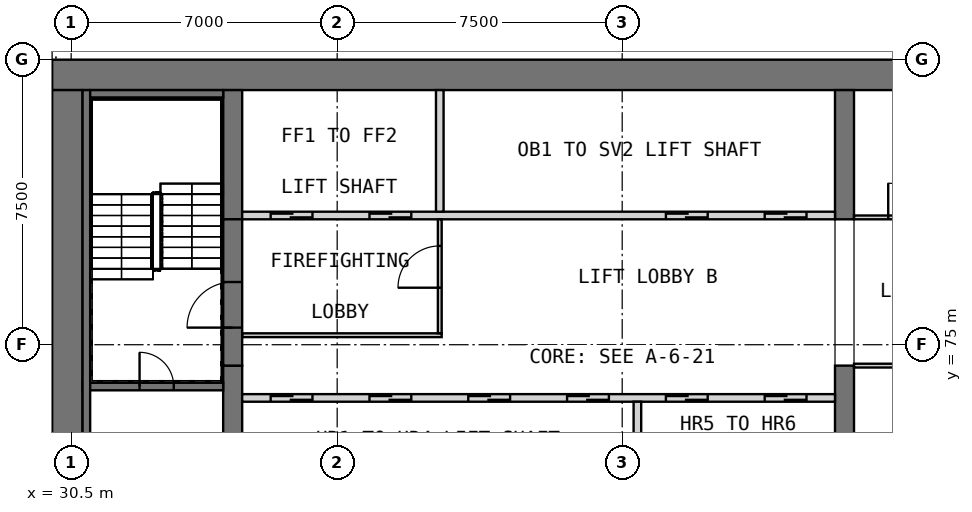
"""IFC4 building model, lengths in metres.
Left out: names, types, materials, properties, quantities, classifications, styles, units other than length and angle.
Written with IfcOpenShell. Run it as: python <this file> out.ifc"""

import sys

from ifc_helpers import new_model, si_unit, direction, frame, frame_2d, origin, place, context, subcontext, project, spatial, rectangle, extrude, element, fill, save


model = new_model("IFC4")
c1 = context("Model", 3, precision=1e-05, world=origin(), true_north=direction((0.0, 1.0)))
c2 = subcontext(c1, "Body", "Model", "MODEL_VIEW")
j1 = project(units=[si_unit("LENGTHUNIT", "METRE"), si_unit("PLANEANGLEUNIT", "RADIAN")], contexts=[c1])
p1 = place(None, origin())
s1 = spatial("IfcSite", under=j1, at=p1, CompositionType="ELEMENT")
p2 = place(p1, origin())
s2 = spatial("IfcBuilding", under=s1, at=p2, CompositionType="ELEMENT")
p3 = place(p2, frame((0.0, 0.0, 166.2)))
s3 = spatial("IfcBuildingStorey", under=s2, at=p3, CompositionType="ELEMENT", Elevation=166.2)
p4 = place(p3, frame((30.0, 82.1, 0.0), z_axis=(0.0, 0.0, 1.0), x_axis=(1.0, 0.0, 0.0)))
e1 = element("IfcWall", 1, at=p4, inside=s3, PredefinedType="SHEAR", context=c2, shape_type="SweptSolid", body=[
    extrude(rectangle(XDim=30.0, YDim=0.8, at=frame_2d((15.0, 0.0))), origin(), (0.0, 0.0, 1.0), 8.0),
])
p5 = place(p3, frame((30.4, 60.8, 0.0), z_axis=(0.0, 0.0, 1.0), x_axis=(0.0, 1.0, 0.0)))
e2 = element("IfcWall", 2, at=p5, inside=s3, PredefinedType="SHEAR", context=c2, shape_type="SweptSolid", body=[
    extrude(rectangle(XDim=20.9, YDim=0.8, at=frame_2d((10.45, 0.0))), origin(), (0.0, 0.0, 1.0), 8.0),
])
p6 = place(p3, frame((34.75, 68.05, 0.0), z_axis=(0.0, 0.0, 1.0), x_axis=(0.0, 1.0, 0.0)))
e3 = element("IfcWall", 3, at=p6, inside=s3, PredefinedType="SHEAR", context=c2, shape_type="SweptSolid", body=[
    extrude(rectangle(XDim=6.4, YDim=0.5, at=frame_2d((3.2, 0.0))), origin(), (0.0, 0.0, 1.0), 8.0),
])
p7 = place(p3, frame((34.75, 78.3, 0.0), z_axis=(0.0, 0.0, 1.0), x_axis=(0.0, 1.0, 0.0)))
e4 = element("IfcWall", 4, at=p7, inside=s3, PredefinedType="SHEAR", context=c2, shape_type="SweptSolid", body=[
    extrude(rectangle(XDim=3.4, YDim=0.5, at=frame_2d((1.7, 0.0))), origin(), (0.0, 0.0, 1.0), 8.0),
])
p8 = place(p3, frame((50.85, 68.05, 0.0), z_axis=(0.0, 0.0, 1.0), x_axis=(0.0, 1.0, 0.0)))
e5 = element("IfcWall", 5, at=p8, inside=s3, PredefinedType="SHEAR", context=c2, shape_type="SweptSolid", body=[
    extrude(rectangle(XDim=6.4, YDim=0.5, at=frame_2d((3.2, 0.0))), origin(), (0.0, 0.0, 1.0), 8.0),
])
p9 = place(p3, frame((50.85, 78.3, 0.0), z_axis=(0.0, 0.0, 1.0), x_axis=(0.0, 1.0, 0.0)))
e6 = element("IfcWall", 6, at=p9, inside=s3, PredefinedType="SHEAR", context=c2, shape_type="SweptSolid", body=[
    extrude(rectangle(XDim=3.4, YDim=0.5, at=frame_2d((1.7, 0.0))), origin(), (0.0, 0.0, 1.0), 8.0),
])
p10 = place(p3, frame((35.0, 73.6, 0.0), z_axis=(0.0, 0.0, 1.0), x_axis=(1.0, 0.0, 0.0)))
e7 = element("IfcWall", 7, at=p10, inside=s3, PredefinedType="SOLIDWALL", context=c2, shape_type="SweptSolid", body=[
    extrude(rectangle(XDim=15.6, YDim=0.2, at=frame_2d((7.8, 0.0))), origin(), (0.0, 0.0, 1.0), 8.0),
])
p11 = place(p10, frame((0.75, 0.0, 0.0)))
e8 = element("IfcOpeningElement", 8, at=p11, cuts=e7, PredefinedType="OPENING", context=c2, shape_type="SweptSolid", body=[
    extrude(rectangle(XDim=1.1, YDim=2.1, at=frame_2d((0.55, 1.05))), frame((0.0, 0.11, 0.0), z_axis=(0.0, -1.0, 0.0), x_axis=(1.0, 0.0, 0.0)), (0.0, 0.0, 1.0), 0.22),
])
p12 = place(p10, frame((3.35, 0.0, 0.0)))
e9 = element("IfcOpeningElement", 9, at=p12, cuts=e7, PredefinedType="OPENING", context=c2, shape_type="SweptSolid", body=[
    extrude(rectangle(XDim=1.1, YDim=2.1, at=frame_2d((0.55, 1.05))), frame((0.0, 0.11, 0.0), z_axis=(0.0, -1.0, 0.0), x_axis=(1.0, 0.0, 0.0)), (0.0, 0.0, 1.0), 0.22),
])
p13 = place(p10, frame((5.95, 0.0, 0.0)))
e10 = element("IfcOpeningElement", 10, at=p13, cuts=e7, PredefinedType="OPENING", context=c2, shape_type="SweptSolid", body=[
    extrude(rectangle(XDim=1.1, YDim=2.1, at=frame_2d((0.55, 1.05))), frame((0.0, 0.11, 0.0), z_axis=(0.0, -1.0, 0.0), x_axis=(1.0, 0.0, 0.0)), (0.0, 0.0, 1.0), 0.22),
])
p14 = place(p10, frame((8.55, 0.0, 0.0)))
e11 = element("IfcOpeningElement", 11, at=p14, cuts=e7, PredefinedType="OPENING", context=c2, shape_type="SweptSolid", body=[
    extrude(rectangle(XDim=1.1, YDim=2.1, at=frame_2d((0.55, 1.05))), frame((0.0, 0.11, 0.0), z_axis=(0.0, -1.0, 0.0), x_axis=(1.0, 0.0, 0.0)), (0.0, 0.0, 1.0), 0.22),
])
p15 = place(p10, frame((11.15, 0.0, 0.0)))
e12 = element("IfcOpeningElement", 12, at=p15, cuts=e7, PredefinedType="OPENING", context=c2, shape_type="SweptSolid", body=[
    extrude(rectangle(XDim=1.1, YDim=2.1, at=frame_2d((0.55, 1.05))), frame((0.0, 0.11, 0.0), z_axis=(0.0, -1.0, 0.0), x_axis=(1.0, 0.0, 0.0)), (0.0, 0.0, 1.0), 0.22),
])
p16 = place(p10, frame((13.75, 0.0, 0.0)))
e13 = element("IfcOpeningElement", 13, at=p16, cuts=e7, PredefinedType="OPENING", context=c2, shape_type="SweptSolid", body=[
    extrude(rectangle(XDim=1.1, YDim=2.1, at=frame_2d((0.55, 1.05))), frame((0.0, 0.11, 0.0), z_axis=(0.0, -1.0, 0.0), x_axis=(1.0, 0.0, 0.0)), (0.0, 0.0, 1.0), 0.22),
])
p17 = place(p3, frame((45.4, 71.5, 0.0), z_axis=(0.0, 0.0, 1.0), x_axis=(0.0, 1.0, 0.0)))
e14 = element("IfcWall", 14, at=p17, inside=s3, PredefinedType="SOLIDWALL", context=c2, shape_type="SweptSolid", body=[
    extrude(rectangle(XDim=2.0, YDim=0.2, at=frame_2d((1.0, 0.0))), origin(), (0.0, 0.0, 1.0), 8.0),
])
p18 = place(p3, frame((35.0, 78.4, 0.0), z_axis=(0.0, 0.0, 1.0), x_axis=(1.0, 0.0, 0.0)))
e15 = element("IfcWall", 15, at=p18, inside=s3, PredefinedType="SOLIDWALL", context=c2, shape_type="SweptSolid", body=[
    extrude(rectangle(XDim=15.6, YDim=0.2, at=frame_2d((7.8, 0.0))), origin(), (0.0, 0.0, 1.0), 8.0),
])
p19 = place(p18, frame((0.75, 0.0, 0.0)))
e16 = element("IfcOpeningElement", 16, at=p19, cuts=e15, PredefinedType="OPENING", context=c2, shape_type="SweptSolid", body=[
    extrude(rectangle(XDim=1.1, YDim=2.1, at=frame_2d((0.55, 1.05))), frame((0.0, 0.11, 0.0), z_axis=(0.0, -1.0, 0.0), x_axis=(1.0, 0.0, 0.0)), (0.0, 0.0, 1.0), 0.22),
])
p20 = place(p18, frame((3.35, 0.0, 0.0)))
e17 = element("IfcOpeningElement", 17, at=p20, cuts=e15, PredefinedType="OPENING", context=c2, shape_type="SweptSolid", body=[
    extrude(rectangle(XDim=1.1, YDim=2.1, at=frame_2d((0.55, 1.05))), frame((0.0, 0.11, 0.0), z_axis=(0.0, -1.0, 0.0), x_axis=(1.0, 0.0, 0.0)), (0.0, 0.0, 1.0), 0.22),
])
p21 = place(p18, frame((11.15, 0.0, 0.0)))
e18 = element("IfcOpeningElement", 18, at=p21, cuts=e15, PredefinedType="OPENING", context=c2, shape_type="SweptSolid", body=[
    extrude(rectangle(XDim=1.1, YDim=2.1, at=frame_2d((0.55, 1.05))), frame((0.0, 0.11, 0.0), z_axis=(0.0, -1.0, 0.0), x_axis=(1.0, 0.0, 0.0)), (0.0, 0.0, 1.0), 0.22),
])
p22 = place(p18, frame((13.75, 0.0, 0.0)))
e19 = element("IfcOpeningElement", 19, at=p22, cuts=e15, PredefinedType="OPENING", context=c2, shape_type="SweptSolid", body=[
    extrude(rectangle(XDim=1.1, YDim=2.1, at=frame_2d((0.55, 1.05))), frame((0.0, 0.11, 0.0), z_axis=(0.0, -1.0, 0.0), x_axis=(1.0, 0.0, 0.0)), (0.0, 0.0, 1.0), 0.22),
])
p23 = place(p3, frame((40.2, 78.5, 0.0), z_axis=(0.0, 0.0, 1.0), x_axis=(0.0, 1.0, 0.0)))
e20 = element("IfcWall", 20, at=p23, inside=s3, PredefinedType="SOLIDWALL", context=c2, shape_type="SweptSolid", body=[
    extrude(rectangle(XDim=3.2, YDim=0.2, at=frame_2d((1.6, 0.0))), origin(), (0.0, 0.0, 1.0), 8.0),
])
p24 = place(p3, frame((35.0, 75.25, 0.0), z_axis=(0.0, 0.0, 1.0), x_axis=(1.0, 0.0, 0.0)))
e21 = element("IfcWall", 21, at=p24, inside=s3, PredefinedType="PARTITIONING", context=c2, shape_type="SweptSolid", body=[
    extrude(rectangle(XDim=5.25, YDim=0.1, at=frame_2d((2.625, 0.0))), origin(), (0.0, 0.0, 1.0), 7.7),
])
p25 = place(p3, frame((40.2, 75.3, 0.0), z_axis=(0.0, 0.0, 1.0), x_axis=(0.0, 1.0, 0.0)))
e22 = element("IfcWall", 22, at=p25, inside=s3, PredefinedType="PARTITIONING", context=c2, shape_type="SweptSolid", body=[
    extrude(rectangle(XDim=3.0, YDim=0.1, at=frame_2d((1.5, 0.0))), origin(), (0.0, 0.0, 1.0), 7.7),
])
p26 = place(p25, frame((1.2, 0.0, 0.0)))
e23 = element("IfcOpeningElement", 23, at=p26, cuts=e22, PredefinedType="OPENING", context=c2, shape_type="SweptSolid", body=[
    extrude(rectangle(XDim=1.1, YDim=2.1, at=frame_2d((0.55, 1.05))), frame((0.0, 0.06, 0.0), z_axis=(0.0, -1.0, 0.0), x_axis=(1.0, 0.0, 0.0)), (0.0, 0.0, 1.0), 0.12),
])
p27 = place(p3, frame((34.75, 74.45, 0.0), z_axis=(0.0, 0.0, 1.0), x_axis=(0.0, 1.0, 0.0)))
e24 = element("IfcWall", 24, at=p27, inside=s3, PredefinedType="SOLIDWALL", context=c2, shape_type="SweptSolid", body=[
    extrude(rectangle(XDim=3.85, YDim=0.5, at=frame_2d((1.925, 0.0))), origin(), (0.0, 0.0, 1.0), 6.8),
])
p28 = place(p27, frame((1.0, 0.0, 0.0)))
e25 = element("IfcOpeningElement", 25, at=p28, cuts=e24, PredefinedType="OPENING", context=c2, shape_type="SweptSolid", body=[
    extrude(rectangle(XDim=1.2, YDim=2.1, at=frame_2d((0.6, 1.05))), frame((0.0, 0.26, 0.0), z_axis=(0.0, -1.0, 0.0), x_axis=(1.0, 0.0, 0.0)), (0.0, 0.0, 1.0), 0.52),
])
p29 = place(p3, frame((30.8, 73.9, 0.0), z_axis=(0.0, 0.0, 1.0), x_axis=(1.0, 0.0, 0.0)))
e26 = element("IfcWall", 26, at=p29, inside=s3, PredefinedType="SOLIDWALL", context=c2, shape_type="SweptSolid", body=[
    extrude(rectangle(XDim=3.7, YDim=0.2, at=frame_2d((1.85, 0.0))), origin(), (0.0, 0.0, 1.0), 7.7),
])
p30 = place(p29, frame((1.5, 0.0, 0.0)))
e27 = element("IfcOpeningElement", 27, at=p30, cuts=e26, PredefinedType="OPENING", context=c2, shape_type="SweptSolid", body=[
    extrude(rectangle(XDim=0.9, YDim=2.1, at=frame_2d((0.45, 1.05))), frame((0.0, 0.11, 0.0), z_axis=(0.0, -1.0, 0.0), x_axis=(1.0, 0.0, 0.0)), (0.0, 0.0, 1.0), 0.22),
])
p31 = place(p3, frame((30.9, 60.8, 0.0), z_axis=(0.0, 0.0, 1.0), x_axis=(0.0, 1.0, 0.0)))
e28 = element("IfcWall", 28, at=p31, inside=s3, PredefinedType="SOLIDWALL", context=c2, shape_type="SweptSolid", body=[
    extrude(rectangle(XDim=20.9, YDim=0.2, at=frame_2d((10.45, 0.0))), origin(), (0.0, 0.0, 1.0), 7.7),
])
p32 = place(p3, frame((31.0, 81.6, 0.0), z_axis=(0.0, 0.0, 1.0), x_axis=(1.0, 0.0, 0.0)))
e29 = element("IfcWall", 29, at=p32, inside=s3, PredefinedType="SOLIDWALL", context=c2, shape_type="SweptSolid", body=[
    extrude(rectangle(XDim=3.5, YDim=0.2, at=frame_2d((1.75, 0.0))), origin(), (0.0, 0.0, 1.0), 7.7),
])
p33 = place(p3, frame((51.1, 74.45, 0.0), z_axis=(0.0, 0.0, 1.0), x_axis=(1.0, 0.0, 0.0)))
e30 = element("IfcWall", 30, at=p33, inside=s3, PredefinedType="PARTITIONING", context=c2, shape_type="SweptSolid", body=[
    extrude(rectangle(XDim=8.1, YDim=0.1, at=frame_2d((4.05, 0.0))), origin(), (0.0, 0.0, 1.0), 7.7),
])
p34 = place(p33, frame((3.6, 0.0, 0.0)))
e31 = element("IfcOpeningElement", 31, at=p34, cuts=e30, PredefinedType="OPENING", context=c2, shape_type="SweptSolid", body=[
    extrude(rectangle(XDim=0.9, YDim=2.1, at=frame_2d((0.45, 1.05))), frame((0.0, 0.06, 0.0), z_axis=(0.0, -1.0, 0.0), x_axis=(1.0, 0.0, 0.0)), (0.0, 0.0, 1.0), 0.12),
])
p35 = place(p3, frame((51.1, 78.35, 0.0), z_axis=(0.0, 0.0, 1.0), x_axis=(1.0, 0.0, 0.0)))
e32 = element("IfcWall", 32, at=p35, inside=s3, PredefinedType="PARTITIONING", context=c2, shape_type="SweptSolid", body=[
    extrude(rectangle(XDim=8.1, YDim=0.1, at=frame_2d((4.05, 0.0))), origin(), (0.0, 0.0, 1.0), 7.7),
])
p36 = place(p35, frame((0.9, 0.0, 0.0)))
e33 = element("IfcOpeningElement", 33, at=p36, cuts=e32, PredefinedType="OPENING", context=c2, shape_type="SweptSolid", body=[
    extrude(rectangle(XDim=0.9, YDim=2.1, at=frame_2d((0.45, 1.05))), frame((0.0, 0.06, 0.0), z_axis=(0.0, -1.0, 0.0), x_axis=(1.0, 0.0, 0.0)), (0.0, 0.0, 1.0), 0.12),
])
p37 = place(p35, frame((4.95, 0.0, 0.0)))
e34 = element("IfcOpeningElement", 34, at=p37, cuts=e32, PredefinedType="OPENING", context=c2, shape_type="SweptSolid", body=[
    extrude(rectangle(XDim=0.9, YDim=2.1, at=frame_2d((0.45, 1.05))), frame((0.0, 0.06, 0.0), z_axis=(0.0, -1.0, 0.0), x_axis=(1.0, 0.0, 0.0)), (0.0, 0.0, 1.0), 0.12),
])
p38 = place(p11, origin())
e35 = element("IfcDoor", 35, at=p38, inside=s3, OperationType="DOUBLE_DOOR_SLIDING", PredefinedType="DOOR", context=c2, shape_type="SweptSolid", body=[
    extrude(rectangle(XDim=1.1, YDim=2.1, at=frame_2d((0.55, 1.05))), frame((0.0, 0.025, 0.0), z_axis=(0.0, -1.0, 0.0), x_axis=(1.0, 0.0, 0.0)), (0.0, 0.0, 1.0), 0.05),
])
fill(e8, e35)
p39 = place(p12, origin())
e36 = element("IfcDoor", 36, at=p39, inside=s3, OperationType="DOUBLE_DOOR_SLIDING", PredefinedType="DOOR", context=c2, shape_type="SweptSolid", body=[
    extrude(rectangle(XDim=1.1, YDim=2.1, at=frame_2d((0.55, 1.05))), frame((0.0, 0.025, 0.0), z_axis=(0.0, -1.0, 0.0), x_axis=(1.0, 0.0, 0.0)), (0.0, 0.0, 1.0), 0.05),
])
fill(e9, e36)
p40 = place(p13, origin())
e37 = element("IfcDoor", 37, at=p40, inside=s3, OperationType="DOUBLE_DOOR_SLIDING", PredefinedType="DOOR", context=c2, shape_type="SweptSolid", body=[
    extrude(rectangle(XDim=1.1, YDim=2.1, at=frame_2d((0.55, 1.05))), frame((0.0, 0.025, 0.0), z_axis=(0.0, -1.0, 0.0), x_axis=(1.0, 0.0, 0.0)), (0.0, 0.0, 1.0), 0.05),
])
fill(e10, e37)
p41 = place(p14, origin())
e38 = element("IfcDoor", 38, at=p41, inside=s3, OperationType="DOUBLE_DOOR_SLIDING", PredefinedType="DOOR", context=c2, shape_type="SweptSolid", body=[
    extrude(rectangle(XDim=1.1, YDim=2.1, at=frame_2d((0.55, 1.05))), frame((0.0, 0.025, 0.0), z_axis=(0.0, -1.0, 0.0), x_axis=(1.0, 0.0, 0.0)), (0.0, 0.0, 1.0), 0.05),
])
fill(e11, e38)
p42 = place(p15, origin())
e39 = element("IfcDoor", 39, at=p42, inside=s3, OperationType="DOUBLE_DOOR_SLIDING", PredefinedType="DOOR", context=c2, shape_type="SweptSolid", body=[
    extrude(rectangle(XDim=1.1, YDim=2.1, at=frame_2d((0.55, 1.05))), frame((0.0, 0.025, 0.0), z_axis=(0.0, -1.0, 0.0), x_axis=(1.0, 0.0, 0.0)), (0.0, 0.0, 1.0), 0.05),
])
fill(e12, e39)
p43 = place(p16, origin())
e40 = element("IfcDoor", 40, at=p43, inside=s3, OperationType="DOUBLE_DOOR_SLIDING", PredefinedType="DOOR", context=c2, shape_type="SweptSolid", body=[
    extrude(rectangle(XDim=1.1, YDim=2.1, at=frame_2d((0.55, 1.05))), frame((0.0, 0.025, 0.0), z_axis=(0.0, -1.0, 0.0), x_axis=(1.0, 0.0, 0.0)), (0.0, 0.0, 1.0), 0.05),
])
fill(e13, e40)
p44 = place(p19, origin())
e41 = element("IfcDoor", 41, at=p44, inside=s3, OperationType="DOUBLE_DOOR_SLIDING", PredefinedType="DOOR", context=c2, shape_type="SweptSolid", body=[
    extrude(rectangle(XDim=1.1, YDim=2.1, at=frame_2d((0.55, 1.05))), frame((0.0, 0.025, 0.0), z_axis=(0.0, -1.0, 0.0), x_axis=(1.0, 0.0, 0.0)), (0.0, 0.0, 1.0), 0.05),
])
fill(e16, e41)
p45 = place(p20, origin())
e42 = element("IfcDoor", 42, at=p45, inside=s3, OperationType="DOUBLE_DOOR_SLIDING", PredefinedType="DOOR", context=c2, shape_type="SweptSolid", body=[
    extrude(rectangle(XDim=1.1, YDim=2.1, at=frame_2d((0.55, 1.05))), frame((0.0, 0.025, 0.0), z_axis=(0.0, -1.0, 0.0), x_axis=(1.0, 0.0, 0.0)), (0.0, 0.0, 1.0), 0.05),
])
fill(e17, e42)
p46 = place(p21, origin())
e43 = element("IfcDoor", 43, at=p46, inside=s3, OperationType="DOUBLE_DOOR_SLIDING", PredefinedType="DOOR", context=c2, shape_type="SweptSolid", body=[
    extrude(rectangle(XDim=1.1, YDim=2.1, at=frame_2d((0.55, 1.05))), frame((0.0, 0.025, 0.0), z_axis=(0.0, -1.0, 0.0), x_axis=(1.0, 0.0, 0.0)), (0.0, 0.0, 1.0), 0.05),
])
fill(e18, e43)
p47 = place(p22, origin())
e44 = element("IfcDoor", 44, at=p47, inside=s3, OperationType="DOUBLE_DOOR_SLIDING", PredefinedType="DOOR", context=c2, shape_type="SweptSolid", body=[
    extrude(rectangle(XDim=1.1, YDim=2.1, at=frame_2d((0.55, 1.05))), frame((0.0, 0.025, 0.0), z_axis=(0.0, -1.0, 0.0), x_axis=(1.0, 0.0, 0.0)), (0.0, 0.0, 1.0), 0.05),
])
fill(e19, e44)
p48 = place(p26, origin())
e45 = element("IfcDoor", 45, at=p48, inside=s3, OperationType="SINGLE_SWING_LEFT", PredefinedType="DOOR", context=c2, shape_type="SweptSolid", body=[
    extrude(rectangle(XDim=1.1, YDim=2.1, at=frame_2d((0.55, 1.05))), frame((0.0, 0.025, 0.0), z_axis=(0.0, -1.0, 0.0), x_axis=(1.0, 0.0, 0.0)), (0.0, 0.0, 1.0), 0.05),
])
fill(e23, e45)
p49 = place(p28, origin())
e46 = element("IfcDoor", 46, at=p49, inside=s3, OperationType="SINGLE_SWING_RIGHT", PredefinedType="DOOR", context=c2, shape_type="SweptSolid", body=[
    extrude(rectangle(XDim=1.2, YDim=2.1, at=frame_2d((0.6, 1.05))), frame((0.0, 0.025, 0.0), z_axis=(0.0, -1.0, 0.0), x_axis=(1.0, 0.0, 0.0)), (0.0, 0.0, 1.0), 0.05),
])
fill(e25, e46)
p50 = place(p30, origin())
e47 = element("IfcDoor", 47, at=p50, inside=s3, OperationType="SINGLE_SWING_RIGHT", PredefinedType="DOOR", context=c2, shape_type="SweptSolid", body=[
    extrude(rectangle(XDim=0.9, YDim=2.1, at=frame_2d((0.45, 1.05))), frame((0.0, 0.025, 0.0), z_axis=(0.0, -1.0, 0.0), x_axis=(1.0, 0.0, 0.0)), (0.0, 0.0, 1.0), 0.05),
])
fill(e27, e47)
p51 = place(p36, origin())
e48 = element("IfcDoor", 48, at=p51, inside=s3, OperationType="SINGLE_SWING_LEFT", PredefinedType="DOOR", context=c2, shape_type="SweptSolid", body=[
    extrude(rectangle(XDim=0.9, YDim=2.1, at=frame_2d((0.45, 1.05))), frame((0.0, 0.025, 0.0), z_axis=(0.0, -1.0, 0.0), x_axis=(1.0, 0.0, 0.0)), (0.0, 0.0, 1.0), 0.05),
])
fill(e33, e48)
save(model, sys.argv[1])
